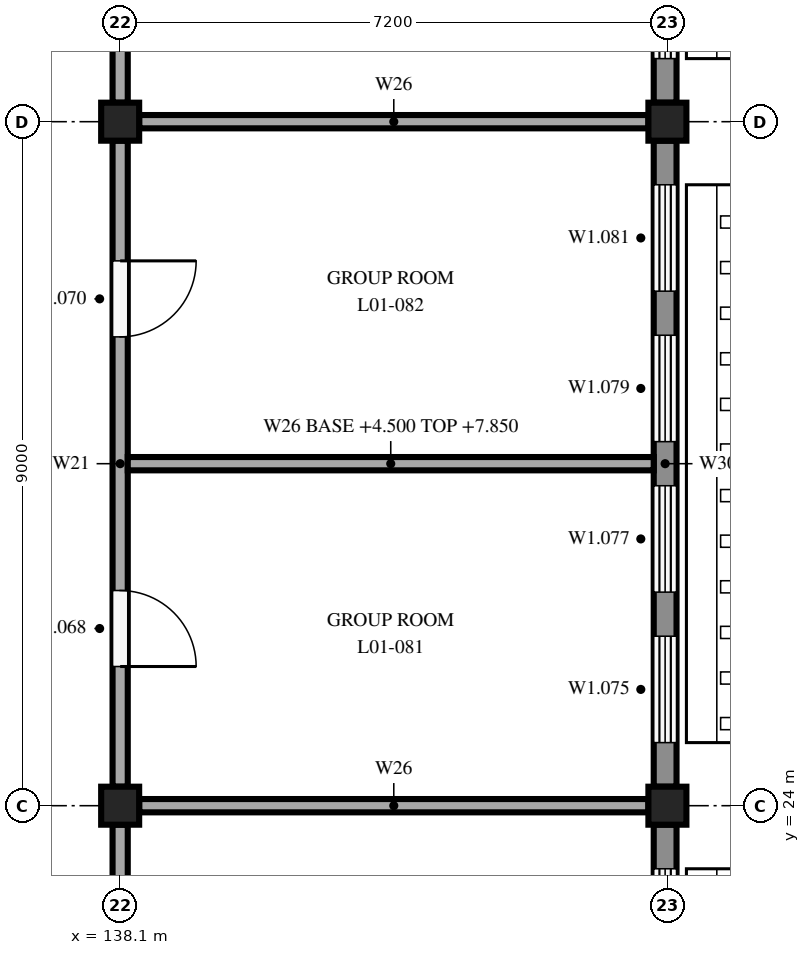
"""IFC4 building model, lengths in metres.
Left out: names, types, materials, properties, quantities, classifications, styles, units other than length and angle.
Written with IfcOpenShell. Run it as: python <this file> out.ifc"""

import sys

from ifc_helpers import new_model, si_unit, direction, frame, frame_2d, origin, origin_2d, place, context, subcontext, project, spatial, rectangle, extrude, element, fill, save


model = new_model("IFC4")
c1 = context("Model", 3, precision=1e-05, world=origin(), true_north=direction((0.0, 1.0)))
c2 = subcontext(c1, "Body", "Model", "MODEL_VIEW")
j1 = project(units=[si_unit("LENGTHUNIT", "METRE"), si_unit("PLANEANGLEUNIT", "RADIAN")], contexts=[c1])
p1 = place(None, origin())
s1 = spatial("IfcSite", under=j1, at=p1, CompositionType="ELEMENT")
p2 = place(p1, origin())
s2 = spatial("IfcBuilding", under=s1, at=p2, CompositionType="ELEMENT")
p3 = place(p2, frame((0.0, 0.0, 4.5)))
s3 = spatial("IfcBuildingStorey", under=s2, at=p3, CompositionType="ELEMENT", Elevation=4.5)
for number, where, z_axis, x_axis in (
    (1, (138.1, 24.0, 0.0), (0.0, 0.0, 1.0), (1.0, 0.0, 0.0)),
    (2, (138.1, 33.0, 0.0), (0.0, 0.0, 1.0), (1.0, 0.0, 0.0)),
    (3, (145.3, 24.0, 0.0), (0.0, 0.0, 1.0), (1.0, 0.0, 0.0)),
    (4, (145.3, 33.0, 0.0), (0.0, 0.0, 1.0), (1.0, 0.0, 0.0)),
):
    element("IfcColumn", number, at=place(p3, frame(where, z_axis=z_axis, x_axis=x_axis)), inside=s3, PredefinedType="COLUMN", context=c2, shape_type="SweptSolid", body=[
        extrude(rectangle(XDim=0.5, YDim=0.5, at=origin_2d()), origin(), (0.0, 0.0, 1.0), 3.35),
    ])
p4 = place(p3, frame((145.27, 23.75, 0.0), z_axis=(0.0, 0.0, 1.0), x_axis=(0.0, -1.0, 0.0)))
e5 = element("IfcWall", 5, at=p4, inside=s3, PredefinedType="STANDARD", context=c2, shape_type="SweptSolid", body=[
    extrude(rectangle(XDim=8.5, YDim=0.3, at=frame_2d((4.25, 0.0))), origin(), (0.0, 0.0, 1.0), 2.85),
])
p5 = place(p4, frame((6.52, 0.0, 0.6)))
e6 = element("IfcOpeningElement", 6, at=p5, cuts=e5, PredefinedType="OPENING", context=c2, shape_type="SweptSolid", body=[
    extrude(rectangle(XDim=1.4, YDim=2.2, at=frame_2d((0.7, 1.1))), frame((0.0, 0.16, 0.0), z_axis=(0.0, -1.0, 0.0), x_axis=(1.0, 0.0, 0.0)), (0.0, 0.0, 1.0), 0.32),
])
p6 = place(p4, frame((4.54, 0.0, 0.6)))
e7 = element("IfcOpeningElement", 7, at=p6, cuts=e5, PredefinedType="OPENING", context=c2, shape_type="SweptSolid", body=[
    extrude(rectangle(XDim=1.4, YDim=2.2, at=frame_2d((0.7, 1.1))), frame((0.0, 0.16, 0.0), z_axis=(0.0, -1.0, 0.0), x_axis=(1.0, 0.0, 0.0)), (0.0, 0.0, 1.0), 0.32),
])
p7 = place(p4, frame((2.56, 0.0, 0.6)))
e8 = element("IfcOpeningElement", 8, at=p7, cuts=e5, PredefinedType="OPENING", context=c2, shape_type="SweptSolid", body=[
    extrude(rectangle(XDim=1.4, YDim=2.2, at=frame_2d((0.7, 1.1))), frame((0.0, 0.16, 0.0), z_axis=(0.0, -1.0, 0.0), x_axis=(1.0, 0.0, 0.0)), (0.0, 0.0, 1.0), 0.32),
])
p8 = place(p4, frame((0.58, 0.0, 0.6)))
e9 = element("IfcOpeningElement", 9, at=p8, cuts=e5, PredefinedType="OPENING", context=c2, shape_type="SweptSolid", body=[
    extrude(rectangle(XDim=1.4, YDim=2.2, at=frame_2d((0.7, 1.1))), frame((0.0, 0.16, 0.0), z_axis=(0.0, -1.0, 0.0), x_axis=(1.0, 0.0, 0.0)), (0.0, 0.0, 1.0), 0.32),
])
p9 = place(p3, frame((145.27, 32.75, 0.0), z_axis=(0.0, 0.0, 1.0), x_axis=(0.0, -1.0, 0.0)))
e10 = element("IfcWall", 10, at=p9, inside=s3, PredefinedType="STANDARD", context=c2, shape_type="SweptSolid", body=[
    extrude(rectangle(XDim=8.5, YDim=0.3, at=frame_2d((4.25, 0.0))), origin(), (0.0, 0.0, 1.0), 2.85),
])
p10 = place(p9, frame((6.52, 0.0, 0.6)))
e11 = element("IfcOpeningElement", 11, at=p10, cuts=e10, PredefinedType="OPENING", context=c2, shape_type="SweptSolid", body=[
    extrude(rectangle(XDim=1.4, YDim=2.2, at=frame_2d((0.7, 1.1))), frame((0.0, 0.16, 0.0), z_axis=(0.0, -1.0, 0.0), x_axis=(1.0, 0.0, 0.0)), (0.0, 0.0, 1.0), 0.32),
])
p11 = place(p9, frame((4.54, 0.0, 0.6)))
e12 = element("IfcOpeningElement", 12, at=p11, cuts=e10, PredefinedType="OPENING", context=c2, shape_type="SweptSolid", body=[
    extrude(rectangle(XDim=1.4, YDim=2.2, at=frame_2d((0.7, 1.1))), frame((0.0, 0.16, 0.0), z_axis=(0.0, -1.0, 0.0), x_axis=(1.0, 0.0, 0.0)), (0.0, 0.0, 1.0), 0.32),
])
p12 = place(p9, frame((2.56, 0.0, 0.6)))
e13 = element("IfcOpeningElement", 13, at=p12, cuts=e10, PredefinedType="OPENING", context=c2, shape_type="SweptSolid", body=[
    extrude(rectangle(XDim=1.4, YDim=2.2, at=frame_2d((0.7, 1.1))), frame((0.0, 0.16, 0.0), z_axis=(0.0, -1.0, 0.0), x_axis=(1.0, 0.0, 0.0)), (0.0, 0.0, 1.0), 0.32),
])
p13 = place(p9, frame((0.58, 0.0, 0.6)))
e14 = element("IfcOpeningElement", 14, at=p13, cuts=e10, PredefinedType="OPENING", context=c2, shape_type="SweptSolid", body=[
    extrude(rectangle(XDim=1.4, YDim=2.2, at=frame_2d((0.7, 1.1))), frame((0.0, 0.16, 0.0), z_axis=(0.0, -1.0, 0.0), x_axis=(1.0, 0.0, 0.0)), (0.0, 0.0, 1.0), 0.32),
])
p14 = place(p3, frame((145.27, 41.75, 0.0), z_axis=(0.0, 0.0, 1.0), x_axis=(0.0, -1.0, 0.0)))
e15 = element("IfcWall", 15, at=p14, inside=s3, PredefinedType="STANDARD", context=c2, shape_type="SweptSolid", body=[
    extrude(rectangle(XDim=8.5, YDim=0.3, at=frame_2d((4.25, 0.0))), origin(), (0.0, 0.0, 1.0), 2.85),
])
p15 = place(p14, frame((6.52, 0.0, 0.6)))
e16 = element("IfcOpeningElement", 16, at=p15, cuts=e15, PredefinedType="OPENING", context=c2, shape_type="SweptSolid", body=[
    extrude(rectangle(XDim=1.4, YDim=2.2, at=frame_2d((0.7, 1.1))), frame((0.0, 0.16, 0.0), z_axis=(0.0, -1.0, 0.0), x_axis=(1.0, 0.0, 0.0)), (0.0, 0.0, 1.0), 0.32),
])
p16 = place(p14, frame((4.54, 0.0, 0.6)))
e17 = element("IfcOpeningElement", 17, at=p16, cuts=e15, PredefinedType="OPENING", context=c2, shape_type="SweptSolid", body=[
    extrude(rectangle(XDim=1.4, YDim=2.2, at=frame_2d((0.7, 1.1))), frame((0.0, 0.16, 0.0), z_axis=(0.0, -1.0, 0.0), x_axis=(1.0, 0.0, 0.0)), (0.0, 0.0, 1.0), 0.32),
])
p17 = place(p14, frame((2.56, 0.0, 0.6)))
e18 = element("IfcOpeningElement", 18, at=p17, cuts=e15, PredefinedType="OPENING", context=c2, shape_type="SweptSolid", body=[
    extrude(rectangle(XDim=1.4, YDim=2.2, at=frame_2d((0.7, 1.1))), frame((0.0, 0.16, 0.0), z_axis=(0.0, -1.0, 0.0), x_axis=(1.0, 0.0, 0.0)), (0.0, 0.0, 1.0), 0.32),
])
p18 = place(p14, frame((0.58, 0.0, 0.6)))
e19 = element("IfcOpeningElement", 19, at=p18, cuts=e15, PredefinedType="OPENING", context=c2, shape_type="SweptSolid", body=[
    extrude(rectangle(XDim=1.4, YDim=2.2, at=frame_2d((0.7, 1.1))), frame((0.0, 0.16, 0.0), z_axis=(0.0, -1.0, 0.0), x_axis=(1.0, 0.0, 0.0)), (0.0, 0.0, 1.0), 0.32),
])
p19 = place(p3, frame((138.1, 23.75, 0.0), z_axis=(0.0, 0.0, 1.0), x_axis=(0.0, -1.0, 0.0)))
e20 = element("IfcWall", 20, at=p19, inside=s3, PredefinedType="PARTITIONING", context=c2, shape_type="SweptSolid", body=[
    extrude(rectangle(XDim=8.5, YDim=0.2, at=frame_2d((4.25, 0.0))), origin(), (0.0, 0.0, 1.0), 2.9),
])
p20 = place(p19, frame((3.75, 0.0, 0.0)))
e21 = element("IfcOpeningElement", 21, at=p20, cuts=e20, PredefinedType="OPENING", context=c2, shape_type="SweptSolid", body=[
    extrude(rectangle(XDim=1.0, YDim=2.1, at=frame_2d((0.5, 1.05))), frame((0.0, 0.11, 0.0), z_axis=(0.0, -1.0, 0.0), x_axis=(1.0, 0.0, 0.0)), (0.0, 0.0, 1.0), 0.22),
])
p21 = place(p3, frame((138.1, 32.75, 0.0), z_axis=(0.0, 0.0, 1.0), x_axis=(0.0, -1.0, 0.0)))
e22 = element("IfcWall", 22, at=p21, inside=s3, PredefinedType="PARTITIONING", context=c2, shape_type="SweptSolid", body=[
    extrude(rectangle(XDim=8.5, YDim=0.2, at=frame_2d((4.25, 0.0))), origin(), (0.0, 0.0, 1.0), 2.9),
])
p22 = place(p21, frame((5.919, 0.0, 0.0)))
e23 = element("IfcOpeningElement", 23, at=p22, cuts=e22, PredefinedType="OPENING", context=c2, shape_type="SweptSolid", body=[
    extrude(rectangle(XDim=1.0, YDim=2.1, at=frame_2d((0.5, 1.05))), frame((0.0, 0.11, 0.0), z_axis=(0.0, -1.0, 0.0), x_axis=(1.0, 0.0, 0.0)), (0.0, 0.0, 1.0), 0.22),
])
p23 = place(p21, frame((1.581, 0.0, 0.0)))
e24 = element("IfcOpeningElement", 24, at=p23, cuts=e22, PredefinedType="OPENING", context=c2, shape_type="SweptSolid", body=[
    extrude(rectangle(XDim=1.0, YDim=2.1, at=frame_2d((0.5, 1.05))), frame((0.0, 0.11, 0.0), z_axis=(0.0, -1.0, 0.0), x_axis=(1.0, 0.0, 0.0)), (0.0, 0.0, 1.0), 0.22),
])
p24 = place(p3, frame((138.1, 41.75, 0.0), z_axis=(0.0, 0.0, 1.0), x_axis=(0.0, -1.0, 0.0)))
e25 = element("IfcWall", 25, at=p24, inside=s3, PredefinedType="PARTITIONING", context=c2, shape_type="SweptSolid", body=[
    extrude(rectangle(XDim=8.5, YDim=0.2, at=frame_2d((4.25, 0.0))), origin(), (0.0, 0.0, 1.0), 2.9),
])
p25 = place(p24, frame((3.75, 0.0, 0.0)))
e26 = element("IfcOpeningElement", 26, at=p25, cuts=e25, PredefinedType="OPENING", context=c2, shape_type="SweptSolid", body=[
    extrude(rectangle(XDim=1.0, YDim=2.1, at=frame_2d((0.5, 1.05))), frame((0.0, 0.11, 0.0), z_axis=(0.0, -1.0, 0.0), x_axis=(1.0, 0.0, 0.0)), (0.0, 0.0, 1.0), 0.22),
])
p26 = place(p3, frame((138.35, 24.0, 0.0), z_axis=(0.0, 0.0, 1.0), x_axis=(1.0, 0.0, 0.0)))
e27 = element("IfcWall", 27, at=p26, inside=s3, PredefinedType="PARTITIONING", context=c2, shape_type="SweptSolid", body=[
    extrude(rectangle(XDim=6.7, YDim=0.175, at=frame_2d((3.35, 0.0))), origin(), (0.0, 0.0, 1.0), 2.9),
])
p27 = place(p3, frame((138.2, 28.5, 0.0), z_axis=(0.0, 0.0, 1.0), x_axis=(1.0, 0.0, 0.0)))
e28 = element("IfcWall", 28, at=p27, inside=s3, PredefinedType="PARTITIONING", context=c2, shape_type="SweptSolid", body=[
    extrude(rectangle(XDim=6.92, YDim=0.175, at=frame_2d((3.46, 0.0))), origin(), (0.0, 0.0, 1.0), 3.35),
])
p28 = place(p3, frame((138.35, 33.0, 0.0), z_axis=(0.0, 0.0, 1.0), x_axis=(1.0, 0.0, 0.0)))
e29 = element("IfcWall", 29, at=p28, inside=s3, PredefinedType="PARTITIONING", context=c2, shape_type="SweptSolid", body=[
    extrude(rectangle(XDim=6.7, YDim=0.175, at=frame_2d((3.35, 0.0))), origin(), (0.0, 0.0, 1.0), 2.9),
])
p29 = place(p8, origin())
e30 = element("IfcWindow", 30, at=p29, inside=s3, PartitioningType="DOUBLE_PANEL_VERTICAL", PredefinedType="WINDOW", context=c2, shape_type="SweptSolid", body=[
    extrude(rectangle(XDim=1.4, YDim=2.2, at=frame_2d((0.7, 1.1))), frame((0.0, 0.03, 0.0), z_axis=(0.0, -1.0, 0.0), x_axis=(1.0, 0.0, 0.0)), (0.0, 0.0, 1.0), 0.06),
])
fill(e9, e30)
p30 = place(p10, origin())
e31 = element("IfcWindow", 31, at=p30, inside=s3, PartitioningType="DOUBLE_PANEL_VERTICAL", PredefinedType="WINDOW", context=c2, shape_type="SweptSolid", body=[
    extrude(rectangle(XDim=1.4, YDim=2.2, at=frame_2d((0.7, 1.1))), frame((0.0, 0.03, 0.0), z_axis=(0.0, -1.0, 0.0), x_axis=(1.0, 0.0, 0.0)), (0.0, 0.0, 1.0), 0.06),
])
fill(e11, e31)
p31 = place(p11, origin())
e32 = element("IfcWindow", 32, at=p31, inside=s3, PartitioningType="DOUBLE_PANEL_VERTICAL", PredefinedType="WINDOW", context=c2, shape_type="SweptSolid", body=[
    extrude(rectangle(XDim=1.4, YDim=2.2, at=frame_2d((0.7, 1.1))), frame((0.0, 0.03, 0.0), z_axis=(0.0, -1.0, 0.0), x_axis=(1.0, 0.0, 0.0)), (0.0, 0.0, 1.0), 0.06),
])
fill(e12, e32)
p32 = place(p12, origin())
e33 = element("IfcWindow", 33, at=p32, inside=s3, PartitioningType="DOUBLE_PANEL_VERTICAL", PredefinedType="WINDOW", context=c2, shape_type="SweptSolid", body=[
    extrude(rectangle(XDim=1.4, YDim=2.2, at=frame_2d((0.7, 1.1))), frame((0.0, 0.03, 0.0), z_axis=(0.0, -1.0, 0.0), x_axis=(1.0, 0.0, 0.0)), (0.0, 0.0, 1.0), 0.06),
])
fill(e13, e33)
p33 = place(p13, origin())
e34 = element("IfcWindow", 34, at=p33, inside=s3, PartitioningType="DOUBLE_PANEL_VERTICAL", PredefinedType="WINDOW", context=c2, shape_type="SweptSolid", body=[
    extrude(rectangle(XDim=1.4, YDim=2.2, at=frame_2d((0.7, 1.1))), frame((0.0, 0.03, 0.0), z_axis=(0.0, -1.0, 0.0), x_axis=(1.0, 0.0, 0.0)), (0.0, 0.0, 1.0), 0.06),
])
fill(e14, e34)
p34 = place(p15, origin())
e35 = element("IfcWindow", 35, at=p34, inside=s3, PartitioningType="DOUBLE_PANEL_VERTICAL", PredefinedType="WINDOW", context=c2, shape_type="SweptSolid", body=[
    extrude(rectangle(XDim=1.4, YDim=2.2, at=frame_2d((0.7, 1.1))), frame((0.0, 0.03, 0.0), z_axis=(0.0, -1.0, 0.0), x_axis=(1.0, 0.0, 0.0)), (0.0, 0.0, 1.0), 0.06),
])
fill(e16, e35)
p35 = place(p22, origin())
e36 = element("IfcDoor", 36, at=p35, inside=s3, OperationType="SINGLE_SWING_RIGHT", PredefinedType="DOOR", context=c2, shape_type="SweptSolid", body=[
    extrude(rectangle(XDim=1.0, YDim=2.1, at=frame_2d((0.5, 1.05))), frame((0.0, 0.025, 0.0), z_axis=(0.0, -1.0, 0.0), x_axis=(1.0, 0.0, 0.0)), (0.0, 0.0, 1.0), 0.05),
])
fill(e23, e36)
p36 = place(p23, origin())
e37 = element("IfcDoor", 37, at=p36, inside=s3, OperationType="SINGLE_SWING_LEFT", PredefinedType="DOOR", context=c2, shape_type="SweptSolid", body=[
    extrude(rectangle(XDim=1.0, YDim=2.1, at=frame_2d((0.5, 1.05))), frame((0.0, 0.025, 0.0), z_axis=(0.0, -1.0, 0.0), x_axis=(1.0, 0.0, 0.0)), (0.0, 0.0, 1.0), 0.05),
])
fill(e24, e37)
save(model, sys.argv[1])
